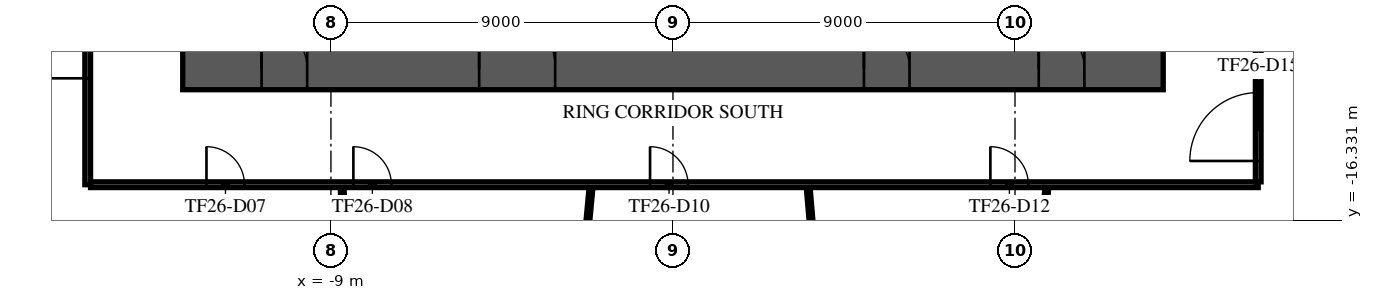
"""IFC4 building model, lengths in metres.
Left out: names, types, materials, properties, quantities, classifications, styles, units other than length and angle.
Written with IfcOpenShell. Run it as: python <this file> out.ifc"""

import sys

from ifc_helpers import new_model, si_unit, direction, frame, frame_2d, origin, place, context, subcontext, project, spatial, rectangle, extrude, element, fill, save


model = new_model("IFC4")
c1 = context("Model", 3, precision=1e-05, world=origin(), true_north=direction((0.0, 1.0)))
c2 = subcontext(c1, "Body", "Model", "MODEL_VIEW")
j1 = project(units=[si_unit("LENGTHUNIT", "METRE"), si_unit("PLANEANGLEUNIT", "RADIAN")], contexts=[c1])
p1 = place(None, origin())
s1 = spatial("IfcSite", under=j1, at=p1, CompositionType="ELEMENT")
p2 = place(p1, origin())
s2 = spatial("IfcBuilding", under=s1, at=p2, CompositionType="ELEMENT")
p3 = place(p2, frame((0.0, 0.0, 114.1)))
s3 = spatial("IfcBuildingStorey", under=s2, at=p3, CompositionType="ELEMENT", Elevation=114.1)
p4 = place(p3, frame((-12.9, -12.35, 0.0), z_axis=(0.0, 0.0, 1.0), x_axis=(1.0, 0.0, 0.0)))
e1 = element("IfcWall", 1, at=p4, inside=s3, PredefinedType="SHEAR", context=c2, shape_type="SweptSolid", body=[
    extrude(rectangle(XDim=25.8, YDim=1.1, at=frame_2d((12.9, 0.0))), origin(), (0.0, 0.0, 1.0), 3.58),
])
p5 = place(p4, frame((7.8, 0.0, 0.0)))
e2 = element("IfcOpeningElement", 2, at=p5, cuts=e1, PredefinedType="OPENING", context=c2, shape_type="SweptSolid", body=[
    extrude(rectangle(XDim=2.0, YDim=2.1, at=frame_2d((1.0, 1.05))), frame((0.0, 0.56, 0.0), z_axis=(0.0, -1.0, 0.0), x_axis=(1.0, 0.0, 0.0)), (0.0, 0.0, 1.0), 1.12),
])
p6 = place(p4, frame((17.925, 0.0, 0.0)))
e3 = element("IfcOpeningElement", 3, at=p6, cuts=e1, PredefinedType="OPENING", context=c2, shape_type="SweptSolid", body=[
    extrude(rectangle(XDim=1.2, YDim=2.1, at=frame_2d((0.6, 1.05))), frame((0.0, 0.56, 0.0), z_axis=(0.0, -1.0, 0.0), x_axis=(1.0, 0.0, 0.0)), (0.0, 0.0, 1.0), 1.12),
])
p7 = place(p4, frame((2.075, 0.0, 0.0)))
e4 = element("IfcOpeningElement", 4, at=p7, cuts=e1, PredefinedType="OPENING", context=c2, shape_type="SweptSolid", body=[
    extrude(rectangle(XDim=1.2, YDim=2.1, at=frame_2d((0.6, 1.05))), frame((0.0, 0.56, 0.0), z_axis=(0.0, -1.0, 0.0), x_axis=(1.0, 0.0, 0.0)), (0.0, 0.0, 1.0), 1.12),
])
p8 = place(p4, frame((22.525, 0.0, 0.0)))
e5 = element("IfcOpeningElement", 5, at=p8, cuts=e1, PredefinedType="OPENING", context=c2, shape_type="SweptSolid", body=[
    extrude(rectangle(XDim=1.2, YDim=2.1, at=frame_2d((0.6, 1.05))), frame((0.0, 0.56, 0.0), z_axis=(0.0, -1.0, 0.0), x_axis=(1.0, 0.0, 0.0)), (0.0, 0.0, 1.0), 1.12),
])
p9 = place(p3, frame((-12.075, -35.218, 0.0), z_axis=(0.0, 0.0, 1.0), x_axis=(0.920504562186, 0.39073181467, 0.0)))
e6 = element("IfcWall", 6, at=p9, inside=s3, PredefinedType="STANDARD", context=c2, shape_type="SweptSolid", body=[
    extrude(rectangle(XDim=49.751, YDim=0.6, at=frame_2d((24.876, 0.0))), origin(), (0.0, 0.0, 1.0), 3.58),
])
p10 = place(p9, frame((1.161, 0.0, 0.9)))
e7 = element("IfcOpeningElement", 7, at=p10, cuts=e6, PredefinedType="OPENING", context=c2, shape_type="SweptSolid", body=[
    extrude(rectangle(XDim=2.1, YDim=2.1, at=frame_2d((1.05, 1.05))), frame((0.0, 0.31, 0.0), z_axis=(0.0, -1.0, 0.0), x_axis=(1.0, 0.0, 0.0)), (0.0, 0.0, 1.0), 0.62),
])
p11 = place(p9, frame((5.644, 0.0, 0.9)))
e8 = element("IfcOpeningElement", 8, at=p11, cuts=e6, PredefinedType="OPENING", context=c2, shape_type="SweptSolid", body=[
    extrude(rectangle(XDim=2.1, YDim=2.1, at=frame_2d((1.05, 1.05))), frame((0.0, 0.31, 0.0), z_axis=(0.0, -1.0, 0.0), x_axis=(1.0, 0.0, 0.0)), (0.0, 0.0, 1.0), 0.62),
])
p12 = place(p9, frame((10.189, 0.0, 0.9)))
e9 = element("IfcOpeningElement", 9, at=p12, cuts=e6, PredefinedType="OPENING", context=c2, shape_type="SweptSolid", body=[
    extrude(rectangle(XDim=2.1, YDim=2.1, at=frame_2d((1.05, 1.05))), frame((0.0, 0.31, 0.0), z_axis=(0.0, -1.0, 0.0), x_axis=(1.0, 0.0, 0.0)), (0.0, 0.0, 1.0), 0.62),
])
p13 = place(p9, frame((14.735, 0.0, 0.9)))
e10 = element("IfcOpeningElement", 10, at=p13, cuts=e6, PredefinedType="OPENING", context=c2, shape_type="SweptSolid", body=[
    extrude(rectangle(XDim=2.1, YDim=2.1, at=frame_2d((1.05, 1.05))), frame((0.0, 0.31, 0.0), z_axis=(0.0, -1.0, 0.0), x_axis=(1.0, 0.0, 0.0)), (0.0, 0.0, 1.0), 0.62),
])
p14 = place(p9, frame((19.28, 0.0, 0.9)))
e11 = element("IfcOpeningElement", 11, at=p14, cuts=e6, PredefinedType="OPENING", context=c2, shape_type="SweptSolid", body=[
    extrude(rectangle(XDim=2.1, YDim=2.1, at=frame_2d((1.05, 1.05))), frame((0.0, 0.31, 0.0), z_axis=(0.0, -1.0, 0.0), x_axis=(1.0, 0.0, 0.0)), (0.0, 0.0, 1.0), 0.62),
])
p15 = place(p9, frame((23.826, 0.0, 0.9)))
e12 = element("IfcOpeningElement", 12, at=p15, cuts=e6, PredefinedType="OPENING", context=c2, shape_type="SweptSolid", body=[
    extrude(rectangle(XDim=2.1, YDim=2.1, at=frame_2d((1.05, 1.05))), frame((0.0, 0.31, 0.0), z_axis=(0.0, -1.0, 0.0), x_axis=(1.0, 0.0, 0.0)), (0.0, 0.0, 1.0), 0.62),
])
p16 = place(p9, frame((28.371, 0.0, 0.9)))
e13 = element("IfcOpeningElement", 13, at=p16, cuts=e6, PredefinedType="OPENING", context=c2, shape_type="SweptSolid", body=[
    extrude(rectangle(XDim=2.1, YDim=2.1, at=frame_2d((1.05, 1.05))), frame((0.0, 0.31, 0.0), z_axis=(0.0, -1.0, 0.0), x_axis=(1.0, 0.0, 0.0)), (0.0, 0.0, 1.0), 0.62),
])
p17 = place(p9, frame((32.917, 0.0, 0.9)))
e14 = element("IfcOpeningElement", 14, at=p17, cuts=e6, PredefinedType="OPENING", context=c2, shape_type="SweptSolid", body=[
    extrude(rectangle(XDim=2.1, YDim=2.1, at=frame_2d((1.05, 1.05))), frame((0.0, 0.31, 0.0), z_axis=(0.0, -1.0, 0.0), x_axis=(1.0, 0.0, 0.0)), (0.0, 0.0, 1.0), 0.62),
])
p18 = place(p9, frame((37.462, 0.0, 0.9)))
e15 = element("IfcOpeningElement", 15, at=p18, cuts=e6, PredefinedType="OPENING", context=c2, shape_type="SweptSolid", body=[
    extrude(rectangle(XDim=2.1, YDim=2.1, at=frame_2d((1.05, 1.05))), frame((0.0, 0.31, 0.0), z_axis=(0.0, -1.0, 0.0), x_axis=(1.0, 0.0, 0.0)), (0.0, 0.0, 1.0), 0.62),
])
p19 = place(p9, frame((42.008, 0.0, 0.9)))
e16 = element("IfcOpeningElement", 16, at=p19, cuts=e6, PredefinedType="OPENING", context=c2, shape_type="SweptSolid", body=[
    extrude(rectangle(XDim=2.1, YDim=2.1, at=frame_2d((1.05, 1.05))), frame((0.0, 0.31, 0.0), z_axis=(0.0, -1.0, 0.0), x_axis=(1.0, 0.0, 0.0)), (0.0, 0.0, 1.0), 0.62),
])
p20 = place(p9, frame((46.491, 0.0, 0.9)))
e17 = element("IfcOpeningElement", 17, at=p20, cuts=e6, PredefinedType="OPENING", context=c2, shape_type="SweptSolid", body=[
    extrude(rectangle(XDim=2.1, YDim=2.1, at=frame_2d((1.05, 1.05))), frame((0.0, 0.31, 0.0), z_axis=(0.0, -1.0, 0.0), x_axis=(1.0, 0.0, 0.0)), (0.0, 0.0, 1.0), 0.62),
])
p21 = place(p3, frame((-15.4, -15.4, 0.0), z_axis=(0.0, 0.0, 1.0), x_axis=(0.0, 1.0, 0.0)))
e18 = element("IfcWall", 18, at=p21, inside=s3, PredefinedType="PARTITIONING", context=c2, shape_type="SweptSolid", body=[
    extrude(rectangle(XDim=30.8, YDim=0.15, at=frame_2d((15.4, 0.0))), origin(), (0.0, 0.0, 1.0), 3.08),
])
p22 = place(p21, frame((14.541, 0.0, 0.0)))
e19 = element("IfcOpeningElement", 19, at=p22, cuts=e18, PredefinedType="OPENING", context=c2, shape_type="SweptSolid", body=[
    extrude(rectangle(XDim=1.8, YDim=2.1, at=frame_2d((0.9, 1.05))), frame((0.0, 0.085, 0.0), z_axis=(0.0, -1.0, 0.0), x_axis=(1.0, 0.0, 0.0)), (0.0, 0.0, 1.0), 0.17),
])
p23 = place(p21, frame((19.041, 0.0, 0.0)))
e20 = element("IfcOpeningElement", 20, at=p23, cuts=e18, PredefinedType="OPENING", context=c2, shape_type="SweptSolid", body=[
    extrude(rectangle(XDim=1.0, YDim=2.1, at=frame_2d((0.5, 1.05))), frame((0.0, 0.085, 0.0), z_axis=(0.0, -1.0, 0.0), x_axis=(1.0, 0.0, 0.0)), (0.0, 0.0, 1.0), 0.17),
])
p24 = place(p21, frame((11.333, 0.0, 0.0)))
e21 = element("IfcOpeningElement", 21, at=p24, cuts=e18, PredefinedType="OPENING", context=c2, shape_type="SweptSolid", body=[
    extrude(rectangle(XDim=1.0, YDim=2.1, at=frame_2d((0.5, 1.05))), frame((0.0, 0.085, 0.0), z_axis=(0.0, -1.0, 0.0), x_axis=(1.0, 0.0, 0.0)), (0.0, 0.0, 1.0), 0.17),
])
p25 = place(p21, frame((25.77, 0.0, 0.0)))
e22 = element("IfcOpeningElement", 22, at=p25, cuts=e18, PredefinedType="OPENING", context=c2, shape_type="SweptSolid", body=[
    extrude(rectangle(XDim=1.8, YDim=2.1, at=frame_2d((0.9, 1.05))), frame((0.0, 0.085, 0.0), z_axis=(0.0, -1.0, 0.0), x_axis=(1.0, 0.0, 0.0)), (0.0, 0.0, 1.0), 0.17),
])
p26 = place(p21, frame((2.8, 0.0, 0.0)))
e23 = element("IfcOpeningElement", 23, at=p26, cuts=e18, PredefinedType="OPENING", context=c2, shape_type="SweptSolid", body=[
    extrude(rectangle(XDim=1.8, YDim=2.1, at=frame_2d((0.9, 1.05))), frame((0.0, 0.085, 0.0), z_axis=(0.0, -1.0, 0.0), x_axis=(1.0, 0.0, 0.0)), (0.0, 0.0, 1.0), 0.17),
])
p27 = place(p3, frame((-15.325, -15.4, 0.0), z_axis=(0.0, 0.0, 1.0), x_axis=(1.0, 0.0, 0.0)))
e24 = element("IfcWall", 24, at=p27, inside=s3, PredefinedType="PARTITIONING", context=c2, shape_type="SweptSolid", body=[
    extrude(rectangle(XDim=30.725, YDim=0.15, at=frame_2d((15.362, 0.0))), origin(), (0.0, 0.0, 1.0), 3.08),
])
p28 = place(p27, frame((3.05, 0.0, 0.0)))
e25 = element("IfcOpeningElement", 25, at=p28, cuts=e24, PredefinedType="OPENING", context=c2, shape_type="SweptSolid", body=[
    extrude(rectangle(XDim=1.0, YDim=2.1, at=frame_2d((0.5, 1.05))), frame((0.0, 0.085, 0.0), z_axis=(0.0, -1.0, 0.0), x_axis=(1.0, 0.0, 0.0)), (0.0, 0.0, 1.0), 0.17),
])
p29 = place(p27, frame((6.916, 0.0, 0.0)))
e26 = element("IfcOpeningElement", 26, at=p29, cuts=e24, PredefinedType="OPENING", context=c2, shape_type="SweptSolid", body=[
    extrude(rectangle(XDim=1.0, YDim=2.1, at=frame_2d((0.5, 1.05))), frame((0.0, 0.085, 0.0), z_axis=(0.0, -1.0, 0.0), x_axis=(1.0, 0.0, 0.0)), (0.0, 0.0, 1.0), 0.17),
])
p30 = place(p27, frame((14.722, 0.0, 0.0)))
e27 = element("IfcOpeningElement", 27, at=p30, cuts=e24, PredefinedType="OPENING", context=c2, shape_type="SweptSolid", body=[
    extrude(rectangle(XDim=1.0, YDim=2.1, at=frame_2d((0.5, 1.05))), frame((0.0, 0.085, 0.0), z_axis=(0.0, -1.0, 0.0), x_axis=(1.0, 0.0, 0.0)), (0.0, 0.0, 1.0), 0.17),
])
p31 = place(p27, frame((23.677, 0.0, 0.0)))
e28 = element("IfcOpeningElement", 28, at=p31, cuts=e24, PredefinedType="OPENING", context=c2, shape_type="SweptSolid", body=[
    extrude(rectangle(XDim=1.0, YDim=2.1, at=frame_2d((0.5, 1.05))), frame((0.0, 0.085, 0.0), z_axis=(0.0, -1.0, 0.0), x_axis=(1.0, 0.0, 0.0)), (0.0, 0.0, 1.0), 0.17),
])
p32 = place(p3, frame((15.4, -15.325, 0.0), z_axis=(0.0, 0.0, 1.0), x_axis=(0.0, 1.0, 0.0)))
e29 = element("IfcWall", 29, at=p32, inside=s3, PredefinedType="PARTITIONING", context=c2, shape_type="SweptSolid", body=[
    extrude(rectangle(XDim=30.65, YDim=0.15, at=frame_2d((15.325, 0.0))), origin(), (0.0, 0.0, 1.0), 3.08),
])
p33 = place(p32, frame((25.855, 0.0, 0.0)))
e30 = element("IfcOpeningElement", 30, at=p33, cuts=e29, PredefinedType="OPENING", context=c2, shape_type="SweptSolid", body=[
    extrude(rectangle(XDim=1.8, YDim=2.1, at=frame_2d((0.9, 1.05))), frame((0.0, 0.085, 0.0), z_axis=(0.0, -1.0, 0.0), x_axis=(1.0, 0.0, 0.0)), (0.0, 0.0, 1.0), 0.17),
])
p34 = place(p32, frame((0.55, 0.0, 0.0)))
e31 = element("IfcOpeningElement", 31, at=p34, cuts=e29, PredefinedType="OPENING", context=c2, shape_type="SweptSolid", body=[
    extrude(rectangle(XDim=1.8, YDim=2.1, at=frame_2d((0.9, 1.05))), frame((0.0, 0.085, 0.0), z_axis=(0.0, -1.0, 0.0), x_axis=(1.0, 0.0, 0.0)), (0.0, 0.0, 1.0), 0.17),
])
p35 = place(p32, frame((7.8, 0.0, 0.0)))
e32 = element("IfcOpeningElement", 32, at=p35, cuts=e29, PredefinedType="OPENING", context=c2, shape_type="SweptSolid", body=[
    extrude(rectangle(XDim=1.0, YDim=2.1, at=frame_2d((0.5, 1.05))), frame((0.0, 0.085, 0.0), z_axis=(0.0, -1.0, 0.0), x_axis=(1.0, 0.0, 0.0)), (0.0, 0.0, 1.0), 0.17),
])
p36 = place(p32, frame((18.448, 0.0, 0.0)))
e33 = element("IfcOpeningElement", 33, at=p36, cuts=e29, PredefinedType="OPENING", context=c2, shape_type="SweptSolid", body=[
    extrude(rectangle(XDim=1.0, YDim=2.1, at=frame_2d((0.5, 1.05))), frame((0.0, 0.085, 0.0), z_axis=(0.0, -1.0, 0.0), x_axis=(1.0, 0.0, 0.0)), (0.0, 0.0, 1.0), 0.17),
])
p37 = place(p32, frame((14.308, 0.0, 0.0)))
e34 = element("IfcOpeningElement", 34, at=p37, cuts=e29, PredefinedType="OPENING", context=c2, shape_type="SweptSolid", body=[
    extrude(rectangle(XDim=1.0, YDim=2.1, at=frame_2d((0.5, 1.05))), frame((0.0, 0.085, 0.0), z_axis=(0.0, -1.0, 0.0), x_axis=(1.0, 0.0, 0.0)), (0.0, 0.0, 1.0), 0.17),
])
p38 = place(p3, frame((-8.706, -15.477, 0.0), z_axis=(0.0, 0.0, 1.0), x_axis=(0.044654718462, -0.999002480537, 0.0)))
e35 = element("IfcWall", 35, at=p38, inside=s3, PredefinedType="PARTITIONING", context=c2, shape_type="SweptSolid", body=[
    extrude(rectangle(XDim=17.665, YDim=0.1, at=frame_2d((8.833, 0.0))), origin(), (0.0, 0.0, 1.0), 2.83),
])
p39 = place(p3, frame((-3.36, -28.321, 0.0), z_axis=(0.0, 0.0, 1.0), x_axis=(0.093320771667, 0.995636094954, 0.0)))
e36 = element("IfcWall", 36, at=p39, inside=s3, PredefinedType="PARTITIONING", context=c2, shape_type="SweptSolid", body=[
    extrude(rectangle(XDim=12.898, YDim=0.1, at=frame_2d((6.449, 0.0))), origin(), (0.0, 0.0, 1.0), 2.83),
])
p40 = place(p3, frame((3.559, -15.479, 0.0), z_axis=(0.0, 0.0, 1.0), x_axis=(0.08504742067, -0.996376904709, 0.0)))
e37 = element("IfcWall", 37, at=p40, inside=s3, PredefinedType="PARTITIONING", context=c2, shape_type="SweptSolid", body=[
    extrude(rectangle(XDim=12.373, YDim=0.1, at=frame_2d((6.186, 0.0))), origin(), (0.0, 0.0, 1.0), 2.83),
])
p41 = place(p3, frame((9.158, -23.158, 0.0), z_axis=(0.0, 0.0, 1.0), x_axis=(0.088176658473, 0.996104852363, 0.0)))
e38 = element("IfcWall", 38, at=p41, inside=s3, PredefinedType="PARTITIONING", context=c2, shape_type="SweptSolid", body=[
    extrude(rectangle(XDim=7.708, YDim=0.1, at=frame_2d((3.854, 0.0))), origin(), (0.0, 0.0, 1.0), 2.96),
])
p42 = place(p5, origin())
e39 = element("IfcDoor", 39, at=p42, inside=s3, OperationType="SINGLE_SWING_LEFT", PredefinedType="DOOR", context=c2, shape_type="SweptSolid", body=[
    extrude(rectangle(XDim=2.0, YDim=2.1, at=frame_2d((1.0, 1.05))), frame((0.0, 0.025, 0.0), z_axis=(0.0, -1.0, 0.0), x_axis=(1.0, 0.0, 0.0)), (0.0, 0.0, 1.0), 0.05),
])
fill(e2, e39)
p43 = place(p6, origin())
e40 = element("IfcDoor", 40, at=p43, inside=s3, OperationType="SINGLE_SWING_LEFT", PredefinedType="DOOR", context=c2, shape_type="SweptSolid", body=[
    extrude(rectangle(XDim=1.2, YDim=2.1, at=frame_2d((0.6, 1.05))), frame((0.0, 0.025, 0.0), z_axis=(0.0, -1.0, 0.0), x_axis=(1.0, 0.0, 0.0)), (0.0, 0.0, 1.0), 0.05),
])
fill(e3, e40)
p44 = place(p7, origin())
e41 = element("IfcDoor", 41, at=p44, inside=s3, OperationType="SINGLE_SWING_LEFT", PredefinedType="DOOR", context=c2, shape_type="SweptSolid", body=[
    extrude(rectangle(XDim=1.2, YDim=2.1, at=frame_2d((0.6, 1.05))), frame((0.0, 0.025, 0.0), z_axis=(0.0, -1.0, 0.0), x_axis=(1.0, 0.0, 0.0)), (0.0, 0.0, 1.0), 0.05),
])
fill(e4, e41)
p45 = place(p8, origin())
e42 = element("IfcDoor", 42, at=p45, inside=s3, OperationType="SINGLE_SWING_LEFT", PredefinedType="DOOR", context=c2, shape_type="SweptSolid", body=[
    extrude(rectangle(XDim=1.2, YDim=2.1, at=frame_2d((0.6, 1.05))), frame((0.0, 0.025, 0.0), z_axis=(0.0, -1.0, 0.0), x_axis=(1.0, 0.0, 0.0)), (0.0, 0.0, 1.0), 0.05),
])
fill(e5, e42)
p46 = place(p26, origin())
e43 = element("IfcDoor", 43, at=p46, inside=s3, OperationType="DOUBLE_DOOR_SINGLE_SWING", PredefinedType="DOOR", context=c2, shape_type="SweptSolid", body=[
    extrude(rectangle(XDim=1.8, YDim=2.1, at=frame_2d((0.9, 1.05))), frame((0.0, 0.025, 0.0), z_axis=(0.0, -1.0, 0.0), x_axis=(1.0, 0.0, 0.0)), (0.0, 0.0, 1.0), 0.05),
])
fill(e23, e43)
p47 = place(p28, frame((1.0, 0.0, 0.0), z_axis=(0.0, 0.0, 1.0), x_axis=(-1.0, 0.0, 0.0)))
e44 = element("IfcDoor", 44, at=p47, inside=s3, OperationType="SINGLE_SWING_LEFT", PredefinedType="DOOR", context=c2, shape_type="SweptSolid", body=[
    extrude(rectangle(XDim=1.0, YDim=2.1, at=frame_2d((0.5, 1.05))), frame((0.0, 0.025, 0.0), z_axis=(0.0, -1.0, 0.0), x_axis=(1.0, 0.0, 0.0)), (0.0, 0.0, 1.0), 0.05),
])
fill(e25, e44)
p48 = place(p29, frame((1.0, 0.0, 0.0), z_axis=(0.0, 0.0, 1.0), x_axis=(-1.0, 0.0, 0.0)))
e45 = element("IfcDoor", 45, at=p48, inside=s3, OperationType="SINGLE_SWING_RIGHT", PredefinedType="DOOR", context=c2, shape_type="SweptSolid", body=[
    extrude(rectangle(XDim=1.0, YDim=2.1, at=frame_2d((0.5, 1.05))), frame((0.0, 0.025, 0.0), z_axis=(0.0, -1.0, 0.0), x_axis=(1.0, 0.0, 0.0)), (0.0, 0.0, 1.0), 0.05),
])
fill(e26, e45)
p49 = place(p30, frame((1.0, 0.0, 0.0), z_axis=(0.0, 0.0, 1.0), x_axis=(-1.0, 0.0, 0.0)))
e46 = element("IfcDoor", 46, at=p49, inside=s3, OperationType="SINGLE_SWING_RIGHT", PredefinedType="DOOR", context=c2, shape_type="SweptSolid", body=[
    extrude(rectangle(XDim=1.0, YDim=2.1, at=frame_2d((0.5, 1.05))), frame((0.0, 0.025, 0.0), z_axis=(0.0, -1.0, 0.0), x_axis=(1.0, 0.0, 0.0)), (0.0, 0.0, 1.0), 0.05),
])
fill(e27, e46)
p50 = place(p31, frame((1.0, 0.0, 0.0), z_axis=(0.0, 0.0, 1.0), x_axis=(-1.0, 0.0, 0.0)))
e47 = element("IfcDoor", 47, at=p50, inside=s3, OperationType="SINGLE_SWING_LEFT", PredefinedType="DOOR", context=c2, shape_type="SweptSolid", body=[
    extrude(rectangle(XDim=1.0, YDim=2.1, at=frame_2d((0.5, 1.05))), frame((0.0, 0.025, 0.0), z_axis=(0.0, -1.0, 0.0), x_axis=(1.0, 0.0, 0.0)), (0.0, 0.0, 1.0), 0.05),
])
fill(e28, e47)
p51 = place(p34, frame((1.8, 0.0, 0.0), z_axis=(0.0, 0.0, 1.0), x_axis=(-1.0, 0.0, 0.0)))
e48 = element("IfcDoor", 48, at=p51, inside=s3, OperationType="DOUBLE_DOOR_SINGLE_SWING", PredefinedType="DOOR", context=c2, shape_type="SweptSolid", body=[
    extrude(rectangle(XDim=1.8, YDim=2.1, at=frame_2d((0.9, 1.05))), frame((0.0, 0.025, 0.0), z_axis=(0.0, -1.0, 0.0), x_axis=(1.0, 0.0, 0.0)), (0.0, 0.0, 1.0), 0.05),
])
fill(e31, e48)
save(model, sys.argv[1])
